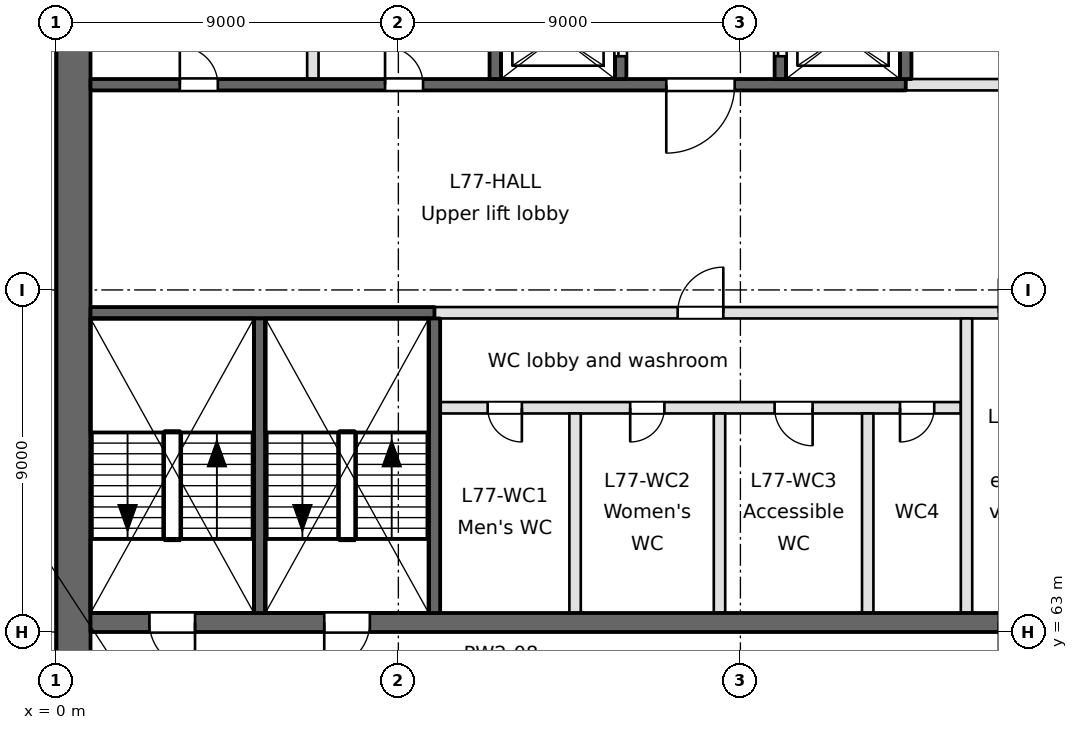
"""IFC4 building model, lengths in metres.
Left out: names, types, materials, properties, quantities, classifications, styles, units other than length and angle.
Written with IfcOpenShell. Run it as: python <this file> out.ifc"""

import sys

from ifc_helpers import new_model, si_unit, direction, frame, frame_2d, origin, place, context, subcontext, project, spatial, rectangle, extrude, element, fill, save


model = new_model("IFC4")
c1 = context("Model", 3, precision=1e-05, world=origin(), true_north=direction((0.0, 1.0)))
c2 = subcontext(c1, "Body", "Model", "MODEL_VIEW")
j1 = project(units=[si_unit("LENGTHUNIT", "METRE"), si_unit("PLANEANGLEUNIT", "RADIAN")], contexts=[c1])
p1 = place(None, origin())
s1 = spatial("IfcSite", under=j1, at=p1, CompositionType="ELEMENT")
p2 = place(p1, origin())
s2 = spatial("IfcBuilding", under=s1, at=p2, CompositionType="ELEMENT")
p3 = place(p2, frame((0.0, 0.0, 299.3)))
s3 = spatial("IfcBuildingStorey", under=s2, at=p3, CompositionType="ELEMENT", Elevation=299.3)
p4 = place(p3, frame((0.45, 94.5, 0.0), z_axis=(0.0, 0.0, 1.0), x_axis=(0.0, -1.0, 0.0)))
e1 = element("IfcWall", 1, at=p4, inside=s3, PredefinedType="SHEAR", context=c2, shape_type="SweptSolid", body=[
    extrude(rectangle(XDim=40.456, YDim=0.9, at=frame_2d((20.228, 0.0))), origin(), (0.0, 0.0, 1.0), 3.7),
])
p5 = place(p3, frame((0.9, 63.25, -0.4), z_axis=(0.0, 0.0, 1.0), x_axis=(1.0, 0.0, 0.0)))
e2 = element("IfcWall", 2, at=p5, inside=s3, PredefinedType="SOLIDWALL", context=c2, shape_type="SweptSolid", body=[
    extrude(rectangle(XDim=35.1, YDim=0.5, at=frame_2d((17.55, 0.0))), origin(), (0.0, 0.0, 1.0), 3.65),
])
p6 = place(p5, frame((23.9, 0.0, 0.4)))
e3 = element("IfcOpeningElement", 3, at=p6, cuts=e2, PredefinedType="OPENING", context=c2, shape_type="SweptSolid", body=[
    extrude(rectangle(XDim=1.8, YDim=2.1, at=frame_2d((0.9, 1.05))), frame((0.0, 0.25, 0.0), z_axis=(0.0, -1.0, 0.0), x_axis=(1.0, 0.0, 0.0)), (0.0, 0.0, 1.0), 0.5),
])
p7 = place(p5, frame((1.55, 0.0, 0.4)))
e4 = element("IfcOpeningElement", 4, at=p7, cuts=e2, PredefinedType="OPENING", context=c2, shape_type="SweptSolid", body=[
    extrude(rectangle(XDim=1.2, YDim=2.1, at=frame_2d((0.6, 1.05))), frame((0.0, 0.25, 0.0), z_axis=(0.0, -1.0, 0.0), x_axis=(1.0, 0.0, 0.0)), (0.0, 0.0, 1.0), 0.5),
])
p8 = place(p5, frame((6.15, 0.0, 0.4)))
e5 = element("IfcOpeningElement", 5, at=p8, cuts=e2, PredefinedType="OPENING", context=c2, shape_type="SweptSolid", body=[
    extrude(rectangle(XDim=1.2, YDim=2.1, at=frame_2d((0.6, 1.05))), frame((0.0, 0.25, 0.0), z_axis=(0.0, -1.0, 0.0), x_axis=(1.0, 0.0, 0.0)), (0.0, 0.0, 1.0), 0.5),
])
p9 = place(p3, frame((10.1, 68.9, 0.0), z_axis=(0.0, 0.0, 1.0), x_axis=(1.0, 0.0, 0.0)))
e6 = element("IfcWall", 6, at=p9, inside=s3, PredefinedType="PARTITIONING", context=c2, shape_type="SweptSolid", body=[
    extrude(rectangle(XDim=13.7, YDim=0.3, at=frame_2d((6.85, 0.0))), origin(), (0.0, 0.0, 1.0), 3.25),
])
p10 = place(p9, frame((1.25, 0.0, 0.0)))
e7 = element("IfcOpeningElement", 7, at=p10, cuts=e6, PredefinedType="OPENING", context=c2, shape_type="SweptSolid", body=[
    extrude(rectangle(XDim=0.9, YDim=2.1, at=frame_2d((0.45, 1.05))), frame((0.0, 0.15, 0.0), z_axis=(0.0, -1.0, 0.0), x_axis=(1.0, 0.0, 0.0)), (0.0, 0.0, 1.0), 0.3),
])
p11 = place(p9, frame((5.0, 0.0, 0.0)))
e8 = element("IfcOpeningElement", 8, at=p11, cuts=e6, PredefinedType="OPENING", context=c2, shape_type="SweptSolid", body=[
    extrude(rectangle(XDim=0.9, YDim=2.1, at=frame_2d((0.45, 1.05))), frame((0.0, 0.15, 0.0), z_axis=(0.0, -1.0, 0.0), x_axis=(1.0, 0.0, 0.0)), (0.0, 0.0, 1.0), 0.3),
])
p12 = place(p9, frame((8.8, 0.0, 0.0)))
e9 = element("IfcOpeningElement", 9, at=p12, cuts=e6, PredefinedType="OPENING", context=c2, shape_type="SweptSolid", body=[
    extrude(rectangle(XDim=1.0, YDim=2.1, at=frame_2d((0.5, 1.05))), frame((0.0, 0.15, 0.0), z_axis=(0.0, -1.0, 0.0), x_axis=(1.0, 0.0, 0.0)), (0.0, 0.0, 1.0), 0.3),
])
p13 = place(p9, frame((12.1, 0.0, 0.0)))
e10 = element("IfcOpeningElement", 10, at=p13, cuts=e6, PredefinedType="OPENING", context=c2, shape_type="SweptSolid", body=[
    extrude(rectangle(XDim=0.9, YDim=2.1, at=frame_2d((0.45, 1.05))), frame((0.0, 0.15, 0.0), z_axis=(0.0, -1.0, 0.0), x_axis=(1.0, 0.0, 0.0)), (0.0, 0.0, 1.0), 0.3),
])
p14 = place(p3, frame((0.9, 71.4, -0.4), z_axis=(0.0, 0.0, 1.0), x_axis=(1.0, 0.0, 0.0)))
e11 = element("IfcWall", 11, at=p14, inside=s3, PredefinedType="SOLIDWALL", context=c2, shape_type="SweptSolid", body=[
    extrude(rectangle(XDim=9.05, YDim=0.3, at=frame_2d((4.525, 0.0))), origin(), (0.0, 0.0, 1.0), 3.65),
])
p15 = place(p3, frame((9.95, 71.4, 0.0), z_axis=(0.0, 0.0, 1.0), x_axis=(1.0, 0.0, 0.0)))
e12 = element("IfcWall", 12, at=p15, inside=s3, PredefinedType="PARTITIONING", context=c2, shape_type="SweptSolid", body=[
    extrude(rectangle(XDim=17.65, YDim=0.3, at=frame_2d((8.825, 0.0))), origin(), (0.0, 0.0, 1.0), 3.25),
])
p16 = place(p15, frame((14.85, 0.0, 0.0)))
e13 = element("IfcOpeningElement", 13, at=p16, cuts=e12, PredefinedType="OPENING", context=c2, shape_type="SweptSolid", body=[
    extrude(rectangle(XDim=1.8, YDim=2.1, at=frame_2d((0.9, 1.05))), frame((0.0, 0.15, 0.0), z_axis=(0.0, -1.0, 0.0), x_axis=(1.0, 0.0, 0.0)), (0.0, 0.0, 1.0), 0.3),
])
p17 = place(p15, frame((6.4, 0.0, 0.0)))
e14 = element("IfcOpeningElement", 14, at=p17, cuts=e12, PredefinedType="OPENING", context=c2, shape_type="SweptSolid", body=[
    extrude(rectangle(XDim=1.2, YDim=2.1, at=frame_2d((0.6, 1.05))), frame((0.0, 0.15, 0.0), z_axis=(0.0, -1.0, 0.0), x_axis=(1.0, 0.0, 0.0)), (0.0, 0.0, 1.0), 0.3),
])
p18 = place(p3, frame((0.9, 77.4, -0.4), z_axis=(0.0, 0.0, 1.0), x_axis=(1.0, 0.0, 0.0)))
e15 = element("IfcWall", 15, at=p18, inside=s3, PredefinedType="SOLIDWALL", context=c2, shape_type="SweptSolid", body=[
    extrude(rectangle(XDim=21.45, YDim=0.3, at=frame_2d((10.725, 0.0))), origin(), (0.0, 0.0, 1.0), 3.65),
])
p19 = place(p18, frame((15.15, 0.0, 0.4)))
e16 = element("IfcOpeningElement", 16, at=p19, cuts=e15, PredefinedType="OPENING", context=c2, shape_type="SweptSolid", body=[
    extrude(rectangle(XDim=1.8, YDim=2.1, at=frame_2d((0.9, 1.05))), frame((0.0, 0.15, 0.0), z_axis=(0.0, -1.0, 0.0), x_axis=(1.0, 0.0, 0.0)), (0.0, 0.0, 1.0), 0.3),
])
p20 = place(p18, frame((2.35, 0.0, 0.4)))
e17 = element("IfcOpeningElement", 17, at=p20, cuts=e15, PredefinedType="OPENING", context=c2, shape_type="SweptSolid", body=[
    extrude(rectangle(XDim=1.0, YDim=2.1, at=frame_2d((0.5, 1.05))), frame((0.0, 0.15, 0.0), z_axis=(0.0, -1.0, 0.0), x_axis=(1.0, 0.0, 0.0)), (0.0, 0.0, 1.0), 0.3),
])
p21 = place(p18, frame((7.75, 0.0, 0.4)))
e18 = element("IfcOpeningElement", 18, at=p21, cuts=e15, PredefinedType="OPENING", context=c2, shape_type="SweptSolid", body=[
    extrude(rectangle(XDim=1.0, YDim=2.1, at=frame_2d((0.5, 1.05))), frame((0.0, 0.15, 0.0), z_axis=(0.0, -1.0, 0.0), x_axis=(1.0, 0.0, 0.0)), (0.0, 0.0, 1.0), 0.3),
])
p22 = place(p3, frame((22.35, 77.4, 0.0), z_axis=(0.0, 0.0, 1.0), x_axis=(1.0, 0.0, 0.0)))
e19 = element("IfcWall", 19, at=p22, inside=s3, PredefinedType="PARTITIONING", context=c2, shape_type="SweptSolid", body=[
    extrude(rectangle(XDim=13.15, YDim=0.3, at=frame_2d((6.575, 0.0))), origin(), (0.0, 0.0, 1.0), 3.25),
])
p23 = place(p22, frame((3.0, 0.0, 0.0)))
e20 = element("IfcOpeningElement", 20, at=p23, cuts=e19, PredefinedType="OPENING", context=c2, shape_type="SweptSolid", body=[
    extrude(rectangle(XDim=1.0, YDim=2.1, at=frame_2d((0.5, 1.05))), frame((0.0, 0.15, 0.0), z_axis=(0.0, -1.0, 0.0), x_axis=(1.0, 0.0, 0.0)), (0.0, 0.0, 1.0), 0.3),
])
p24 = place(p22, frame((9.7, 0.0, 0.0)))
e21 = element("IfcOpeningElement", 21, at=p24, cuts=e19, PredefinedType="OPENING", context=c2, shape_type="SweptSolid", body=[
    extrude(rectangle(XDim=1.0, YDim=2.1, at=frame_2d((0.5, 1.05))), frame((0.0, 0.15, 0.0), z_axis=(0.0, -1.0, 0.0), x_axis=(1.0, 0.0, 0.0)), (0.0, 0.0, 1.0), 0.3),
])
p25 = place(p3, frame((5.35, 63.5, -0.4), z_axis=(0.0, 0.0, 1.0), x_axis=(0.0, 1.0, 0.0)))
e22 = element("IfcWall", 22, at=p25, inside=s3, PredefinedType="SOLIDWALL", context=c2, shape_type="SweptSolid", body=[
    extrude(rectangle(XDim=7.75, YDim=0.3, at=frame_2d((3.875, 0.0))), origin(), (0.0, 0.0, 1.0), 3.65),
])
p26 = place(p3, frame((6.75, 77.55, 0.0), z_axis=(0.0, 0.0, 1.0), x_axis=(0.0, 1.0, 0.0)))
e23 = element("IfcWall", 23, at=p26, inside=s3, PredefinedType="PARTITIONING", context=c2, shape_type="SweptSolid", body=[
    extrude(rectangle(XDim=12.95, YDim=0.3, at=frame_2d((6.475, 0.0))), origin(), (0.0, 0.0, 1.0), 3.25),
])
p27 = place(p3, frame((9.95, 63.5, -0.4), z_axis=(0.0, 0.0, 1.0), x_axis=(0.0, 1.0, 0.0)))
e24 = element("IfcWall", 24, at=p27, inside=s3, PredefinedType="SOLIDWALL", context=c2, shape_type="SweptSolid", body=[
    extrude(rectangle(XDim=7.75, YDim=0.3, at=frame_2d((3.875, 0.0))), origin(), (0.0, 0.0, 1.0), 3.65),
])
p28 = place(p3, frame((11.55, 77.55, -0.4), z_axis=(0.0, 0.0, 1.0), x_axis=(0.0, 1.0, 0.0)))
e25 = element("IfcWall", 25, at=p28, inside=s3, PredefinedType="SOLIDWALL", context=c2, shape_type="SweptSolid", body=[
    extrude(rectangle(XDim=10.1, YDim=0.3, at=frame_2d((5.05, 0.0))), origin(), (0.0, 0.0, 1.0), 3.65),
])
p29 = place(p3, frame((13.65, 63.5, 0.0), z_axis=(0.0, 0.0, 1.0), x_axis=(0.0, 1.0, 0.0)))
e26 = element("IfcWall", 26, at=p29, inside=s3, PredefinedType="PARTITIONING", context=c2, shape_type="SweptSolid", body=[
    extrude(rectangle(XDim=5.25, YDim=0.3, at=frame_2d((2.625, 0.0))), origin(), (0.0, 0.0, 1.0), 3.25),
])
p30 = place(p3, frame((14.85, 77.55, -0.4), z_axis=(0.0, 0.0, 1.0), x_axis=(0.0, 1.0, 0.0)))
e27 = element("IfcWall", 27, at=p30, inside=s3, PredefinedType="SOLIDWALL", context=c2, shape_type="SweptSolid", body=[
    extrude(rectangle(XDim=10.1, YDim=0.3, at=frame_2d((5.05, 0.0))), origin(), (0.0, 0.0, 1.0), 3.65),
])
p31 = place(p30, frame((0.6, 0.0, 0.4)))
e28 = element("IfcOpeningElement", 28, at=p31, cuts=e27, PredefinedType="OPENING", context=c2, shape_type="SweptSolid", body=[
    extrude(rectangle(XDim=1.1, YDim=2.1, at=frame_2d((0.55, 1.05))), frame((0.0, 0.15, 0.0), z_axis=(0.0, -1.0, 0.0), x_axis=(1.0, 0.0, 0.0)), (0.0, 0.0, 1.0), 0.3),
])
p32 = place(p30, frame((3.2, 0.0, 0.4)))
e29 = element("IfcOpeningElement", 29, at=p32, cuts=e27, PredefinedType="OPENING", context=c2, shape_type="SweptSolid", body=[
    extrude(rectangle(XDim=1.1, YDim=2.1, at=frame_2d((0.55, 1.05))), frame((0.0, 0.15, 0.0), z_axis=(0.0, -1.0, 0.0), x_axis=(1.0, 0.0, 0.0)), (0.0, 0.0, 1.0), 0.3),
])
p33 = place(p30, frame((5.8, 0.0, 0.4)))
e30 = element("IfcOpeningElement", 30, at=p33, cuts=e27, PredefinedType="OPENING", context=c2, shape_type="SweptSolid", body=[
    extrude(rectangle(XDim=1.1, YDim=2.1, at=frame_2d((0.55, 1.05))), frame((0.0, 0.15, 0.0), z_axis=(0.0, -1.0, 0.0), x_axis=(1.0, 0.0, 0.0)), (0.0, 0.0, 1.0), 0.3),
])
p34 = place(p30, frame((8.4, 0.0, 0.4)))
e31 = element("IfcOpeningElement", 31, at=p34, cuts=e27, PredefinedType="OPENING", context=c2, shape_type="SweptSolid", body=[
    extrude(rectangle(XDim=1.1, YDim=2.1, at=frame_2d((0.55, 1.05))), frame((0.0, 0.15, 0.0), z_axis=(0.0, -1.0, 0.0), x_axis=(1.0, 0.0, 0.0)), (0.0, 0.0, 1.0), 0.3),
])
p35 = place(p3, frame((17.45, 63.5, 0.0), z_axis=(0.0, 0.0, 1.0), x_axis=(0.0, 1.0, 0.0)))
e32 = element("IfcWall", 32, at=p35, inside=s3, PredefinedType="PARTITIONING", context=c2, shape_type="SweptSolid", body=[
    extrude(rectangle(XDim=5.25, YDim=0.3, at=frame_2d((2.625, 0.0))), origin(), (0.0, 0.0, 1.0), 3.25),
])
p36 = place(p3, frame((19.05, 77.55, -0.4), z_axis=(0.0, 0.0, 1.0), x_axis=(0.0, 1.0, 0.0)))
e33 = element("IfcWall", 33, at=p36, inside=s3, PredefinedType="SOLIDWALL", context=c2, shape_type="SweptSolid", body=[
    extrude(rectangle(XDim=10.1, YDim=0.3, at=frame_2d((5.05, 0.0))), origin(), (0.0, 0.0, 1.0), 3.65),
])
p37 = place(p36, frame((0.6, 0.0, 0.4)))
e34 = element("IfcOpeningElement", 34, at=p37, cuts=e33, PredefinedType="OPENING", context=c2, shape_type="SweptSolid", body=[
    extrude(rectangle(XDim=1.1, YDim=2.1, at=frame_2d((0.55, 1.05))), frame((0.0, 0.15, 0.0), z_axis=(0.0, -1.0, 0.0), x_axis=(1.0, 0.0, 0.0)), (0.0, 0.0, 1.0), 0.3),
])
p38 = place(p36, frame((3.2, 0.0, 0.4)))
e35 = element("IfcOpeningElement", 35, at=p38, cuts=e33, PredefinedType="OPENING", context=c2, shape_type="SweptSolid", body=[
    extrude(rectangle(XDim=1.1, YDim=2.1, at=frame_2d((0.55, 1.05))), frame((0.0, 0.15, 0.0), z_axis=(0.0, -1.0, 0.0), x_axis=(1.0, 0.0, 0.0)), (0.0, 0.0, 1.0), 0.3),
])
p39 = place(p36, frame((5.8, 0.0, 0.4)))
e36 = element("IfcOpeningElement", 36, at=p39, cuts=e33, PredefinedType="OPENING", context=c2, shape_type="SweptSolid", body=[
    extrude(rectangle(XDim=1.1, YDim=2.1, at=frame_2d((0.55, 1.05))), frame((0.0, 0.15, 0.0), z_axis=(0.0, -1.0, 0.0), x_axis=(1.0, 0.0, 0.0)), (0.0, 0.0, 1.0), 0.3),
])
p40 = place(p36, frame((8.4, 0.0, 0.4)))
e37 = element("IfcOpeningElement", 37, at=p40, cuts=e33, PredefinedType="OPENING", context=c2, shape_type="SweptSolid", body=[
    extrude(rectangle(XDim=1.1, YDim=2.1, at=frame_2d((0.55, 1.05))), frame((0.0, 0.15, 0.0), z_axis=(0.0, -1.0, 0.0), x_axis=(1.0, 0.0, 0.0)), (0.0, 0.0, 1.0), 0.3),
])
p41 = place(p3, frame((21.35, 63.5, 0.0), z_axis=(0.0, 0.0, 1.0), x_axis=(0.0, 1.0, 0.0)))
e38 = element("IfcWall", 38, at=p41, inside=s3, PredefinedType="PARTITIONING", context=c2, shape_type="SweptSolid", body=[
    extrude(rectangle(XDim=5.25, YDim=0.3, at=frame_2d((2.625, 0.0))), origin(), (0.0, 0.0, 1.0), 3.25),
])
p42 = place(p3, frame((22.35, 77.55, -0.4), z_axis=(0.0, 0.0, 1.0), x_axis=(0.0, 1.0, 0.0)))
e39 = element("IfcWall", 39, at=p42, inside=s3, PredefinedType="SOLIDWALL", context=c2, shape_type="SweptSolid", body=[
    extrude(rectangle(XDim=10.1, YDim=0.3, at=frame_2d((5.05, 0.0))), origin(), (0.0, 0.0, 1.0), 3.65),
])
p43 = place(p3, frame((23.95, 63.5, 0.0), z_axis=(0.0, 0.0, 1.0), x_axis=(0.0, 1.0, 0.0)))
e40 = element("IfcWall", 40, at=p43, inside=s3, PredefinedType="PARTITIONING", context=c2, shape_type="SweptSolid", body=[
    extrude(rectangle(XDim=7.75, YDim=0.3, at=frame_2d((3.875, 0.0))), origin(), (0.0, 0.0, 1.0), 3.25),
])
p44 = place(p31, origin())
e41 = element("IfcDoor", 41, at=p44, inside=s3, OperationType="SLIDING_TO_RIGHT", PredefinedType="DOOR", context=c2, shape_type="SweptSolid", body=[
    extrude(rectangle(XDim=1.1, YDim=2.1, at=frame_2d((0.55, 1.05))), frame((0.0, 0.025, 0.0), z_axis=(0.0, -1.0, 0.0), x_axis=(1.0, 0.0, 0.0)), (0.0, 0.0, 1.0), 0.05),
])
fill(e28, e41)
p45 = place(p37, origin())
e42 = element("IfcDoor", 42, at=p45, inside=s3, OperationType="SLIDING_TO_RIGHT", PredefinedType="DOOR", context=c2, shape_type="SweptSolid", body=[
    extrude(rectangle(XDim=1.1, YDim=2.1, at=frame_2d((0.55, 1.05))), frame((0.0, 0.025, 0.0), z_axis=(0.0, -1.0, 0.0), x_axis=(1.0, 0.0, 0.0)), (0.0, 0.0, 1.0), 0.05),
])
fill(e34, e42)
p46 = place(p19, frame((1.8, 0.0, 0.0), z_axis=(0.0, 0.0, 1.0), x_axis=(-1.0, 0.0, 0.0)))
e43 = element("IfcDoor", 43, at=p46, inside=s3, OperationType="SINGLE_SWING_RIGHT", PredefinedType="DOOR", context=c2, shape_type="SweptSolid", body=[
    extrude(rectangle(XDim=1.8, YDim=2.1, at=frame_2d((0.9, 1.05))), frame((0.0, 0.025, 0.0), z_axis=(0.0, -1.0, 0.0), x_axis=(1.0, 0.0, 0.0)), (0.0, 0.0, 1.0), 0.05),
])
fill(e16, e43)
p47 = place(p6, frame((1.8, 0.0, 0.0), z_axis=(0.0, 0.0, 1.0), x_axis=(-1.0, 0.0, 0.0)))
e44 = element("IfcDoor", 44, at=p47, inside=s3, OperationType="DOUBLE_DOOR_SINGLE_SWING", PredefinedType="DOOR", context=c2, shape_type="SweptSolid", body=[
    extrude(rectangle(XDim=1.8, YDim=2.1, at=frame_2d((0.9, 1.05))), frame((0.0, 0.025, 0.0), z_axis=(0.0, -1.0, 0.0), x_axis=(1.0, 0.0, 0.0)), (0.0, 0.0, 1.0), 0.05),
])
fill(e3, e44)
p48 = place(p16, origin())
e45 = element("IfcDoor", 45, at=p48, inside=s3, OperationType="DOUBLE_DOOR_SINGLE_SWING", PredefinedType="DOOR", context=c2, shape_type="SweptSolid", body=[
    extrude(rectangle(XDim=1.8, YDim=2.1, at=frame_2d((0.9, 1.05))), frame((0.0, 0.025, 0.0), z_axis=(0.0, -1.0, 0.0), x_axis=(1.0, 0.0, 0.0)), (0.0, 0.0, 1.0), 0.05),
])
fill(e13, e45)
p49 = place(p10, frame((0.9, 0.0, 0.0), z_axis=(0.0, 0.0, 1.0), x_axis=(-1.0, 0.0, 0.0)))
e46 = element("IfcDoor", 46, at=p49, inside=s3, OperationType="SINGLE_SWING_LEFT", PredefinedType="DOOR", context=c2, shape_type="SweptSolid", body=[
    extrude(rectangle(XDim=0.9, YDim=2.1, at=frame_2d((0.45, 1.05))), frame((0.0, 0.025, 0.0), z_axis=(0.0, -1.0, 0.0), x_axis=(1.0, 0.0, 0.0)), (0.0, 0.0, 1.0), 0.05),
])
fill(e7, e46)
p50 = place(p11, frame((0.9, 0.0, 0.0), z_axis=(0.0, 0.0, 1.0), x_axis=(-1.0, 0.0, 0.0)))
e47 = element("IfcDoor", 47, at=p50, inside=s3, OperationType="SINGLE_SWING_RIGHT", PredefinedType="DOOR", context=c2, shape_type="SweptSolid", body=[
    extrude(rectangle(XDim=0.9, YDim=2.1, at=frame_2d((0.45, 1.05))), frame((0.0, 0.025, 0.0), z_axis=(0.0, -1.0, 0.0), x_axis=(1.0, 0.0, 0.0)), (0.0, 0.0, 1.0), 0.05),
])
fill(e8, e47)
p51 = place(p12, frame((1.0, 0.0, 0.0), z_axis=(0.0, 0.0, 1.0), x_axis=(-1.0, 0.0, 0.0)))
e48 = element("IfcDoor", 48, at=p51, inside=s3, OperationType="SINGLE_SWING_LEFT", PredefinedType="DOOR", context=c2, shape_type="SweptSolid", body=[
    extrude(rectangle(XDim=1.0, YDim=2.1, at=frame_2d((0.5, 1.05))), frame((0.0, 0.025, 0.0), z_axis=(0.0, -1.0, 0.0), x_axis=(1.0, 0.0, 0.0)), (0.0, 0.0, 1.0), 0.05),
])
fill(e9, e48)
p52 = place(p13, frame((0.9, 0.0, 0.0), z_axis=(0.0, 0.0, 1.0), x_axis=(-1.0, 0.0, 0.0)))
e49 = element("IfcDoor", 49, at=p52, inside=s3, OperationType="SINGLE_SWING_RIGHT", PredefinedType="DOOR", context=c2, shape_type="SweptSolid", body=[
    extrude(rectangle(XDim=0.9, YDim=2.1, at=frame_2d((0.45, 1.05))), frame((0.0, 0.025, 0.0), z_axis=(0.0, -1.0, 0.0), x_axis=(1.0, 0.0, 0.0)), (0.0, 0.0, 1.0), 0.05),
])
fill(e10, e49)
p53 = place(p17, origin())
e50 = element("IfcDoor", 50, at=p53, inside=s3, OperationType="SINGLE_SWING_RIGHT", PredefinedType="DOOR", context=c2, shape_type="SweptSolid", body=[
    extrude(rectangle(XDim=1.2, YDim=2.1, at=frame_2d((0.6, 1.05))), frame((0.0, 0.025, 0.0), z_axis=(0.0, -1.0, 0.0), x_axis=(1.0, 0.0, 0.0)), (0.0, 0.0, 1.0), 0.05),
])
fill(e14, e50)
p54 = place(p7, frame((1.2, 0.0, 0.0), z_axis=(0.0, 0.0, 1.0), x_axis=(-1.0, 0.0, 0.0)))
e51 = element("IfcDoor", 51, at=p54, inside=s3, OperationType="SINGLE_SWING_LEFT", PredefinedType="DOOR", context=c2, shape_type="SweptSolid", body=[
    extrude(rectangle(XDim=1.2, YDim=2.1, at=frame_2d((0.6, 1.05))), frame((0.0, 0.025, 0.0), z_axis=(0.0, -1.0, 0.0), x_axis=(1.0, 0.0, 0.0)), (0.0, 0.0, 1.0), 0.05),
])
fill(e4, e51)
p55 = place(p8, frame((1.2, 0.0, 0.0), z_axis=(0.0, 0.0, 1.0), x_axis=(-1.0, 0.0, 0.0)))
e52 = element("IfcDoor", 52, at=p55, inside=s3, OperationType="SINGLE_SWING_RIGHT", PredefinedType="DOOR", context=c2, shape_type="SweptSolid", body=[
    extrude(rectangle(XDim=1.2, YDim=2.1, at=frame_2d((0.6, 1.05))), frame((0.0, 0.025, 0.0), z_axis=(0.0, -1.0, 0.0), x_axis=(1.0, 0.0, 0.0)), (0.0, 0.0, 1.0), 0.05),
])
fill(e5, e52)
p56 = place(p20, origin())
e53 = element("IfcDoor", 53, at=p56, inside=s3, OperationType="SINGLE_SWING_LEFT", PredefinedType="DOOR", context=c2, shape_type="SweptSolid", body=[
    extrude(rectangle(XDim=1.0, YDim=2.1, at=frame_2d((0.5, 1.05))), frame((0.0, 0.025, 0.0), z_axis=(0.0, -1.0, 0.0), x_axis=(1.0, 0.0, 0.0)), (0.0, 0.0, 1.0), 0.05),
])
fill(e17, e53)
p57 = place(p21, origin())
e54 = element("IfcDoor", 54, at=p57, inside=s3, OperationType="SINGLE_SWING_LEFT", PredefinedType="DOOR", context=c2, shape_type="SweptSolid", body=[
    extrude(rectangle(XDim=1.0, YDim=2.1, at=frame_2d((0.5, 1.05))), frame((0.0, 0.025, 0.0), z_axis=(0.0, -1.0, 0.0), x_axis=(1.0, 0.0, 0.0)), (0.0, 0.0, 1.0), 0.05),
])
fill(e18, e54)
save(model, sys.argv[1])
